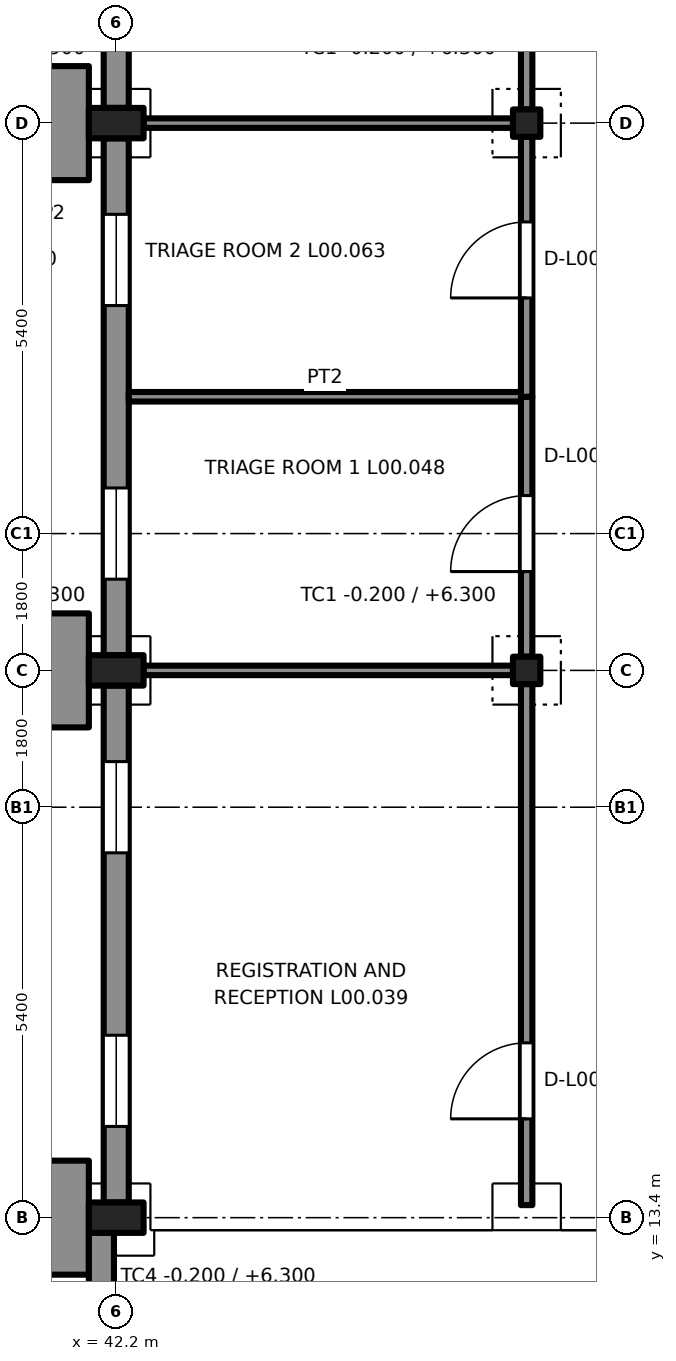
"""IFC4 building model, lengths in metres.
Left out: names, types, materials, properties, quantities, classifications, styles, units other than length and angle.
Written with IfcOpenShell. Run it as: python <this file> out.ifc"""

import sys

from ifc_helpers import new_model, si_unit, direction, frame, frame_2d, origin, origin_2d, place, context, subcontext, project, spatial, rectangle, extrude, element, fill, save


model = new_model("IFC4")
c1 = context("Model", 3, precision=1e-05, world=origin(), true_north=direction((0.0, 1.0)))
c2 = subcontext(c1, "Body", "Model", "MODEL_VIEW")
j1 = project(units=[si_unit("LENGTHUNIT", "METRE"), si_unit("PLANEANGLEUNIT", "RADIAN")], contexts=[c1])
p1 = place(None, origin())
s1 = spatial("IfcSite", under=j1, at=p1, CompositionType="ELEMENT")
p2 = place(p1, origin())
s2 = spatial("IfcBuilding", under=s1, at=p2, CompositionType="ELEMENT")
p3 = place(p2, origin())
s3 = spatial("IfcBuildingStorey", under=s2, at=p3, CompositionType="ELEMENT", Elevation=0.0)
for number, where, z_axis, x_axis in (
    (1, (42.2, 13.4, -0.2), (0.0, 0.0, 1.0), (0.0, 1.0, 0.0)),
    (2, (42.2, 20.6, -0.2), (0.0, 0.0, 1.0), (0.0, 1.0, 0.0)),
    (3, (42.2, 27.8, -0.2), (0.0, 0.0, 1.0), (0.0, 1.0, 0.0)),
):
    element("IfcColumn", number, at=place(p3, frame(where, z_axis=z_axis, x_axis=x_axis)), inside=s3, PredefinedType="COLUMN", context=c2, shape_type="SweptSolid", body=[
        extrude(rectangle(XDim=0.4, YDim=0.72, at=origin_2d()), origin(), (0.0, 0.0, 1.0), 6.5),
    ])
for number, where, z_axis, x_axis in (
    (4, (47.6, 20.6, -0.2), (0.0, 0.0, 1.0), (1.0, 0.0, 0.0)),
    (5, (47.6, 27.8, -0.2), (0.0, 0.0, 1.0), (1.0, 0.0, 0.0)),
):
    element("IfcColumn", number, at=place(p3, frame(where, z_axis=z_axis, x_axis=x_axis)), inside=s3, PredefinedType="COLUMN", context=c2, shape_type="SweptSolid", body=[
        extrude(rectangle(XDim=0.36, YDim=0.36, at=origin_2d()), origin(), (0.0, 0.0, 1.0), 6.5),
    ])
p4 = place(p3, frame((42.2, 13.6, 0.0), z_axis=(0.0, 0.0, 1.0), x_axis=(0.0, 1.0, 0.0)))
e6 = element("IfcWall", 6, at=p4, inside=s3, PredefinedType="SOLIDWALL", context=c2, shape_type="SweptSolid", body=[
    extrude(rectangle(XDim=6.8, YDim=0.33, at=frame_2d((3.4, 0.0))), origin(), (0.0, 0.0, 1.0), 5.62),
])
p5 = place(p4, frame((1.0, 0.0, 0.9)))
e7 = element("IfcOpeningElement", 7, at=p5, cuts=e6, PredefinedType="OPENING", context=c2, shape_type="SweptSolid", body=[
    extrude(rectangle(XDim=1.2, YDim=4.2, at=frame_2d((0.6, 2.1))), frame((0.0, 0.175, 0.0), z_axis=(0.0, -1.0, 0.0), x_axis=(1.0, 0.0, 0.0)), (0.0, 0.0, 1.0), 0.35),
])
p6 = place(p4, frame((4.6, 0.0, 0.9)))
e8 = element("IfcOpeningElement", 8, at=p6, cuts=e6, PredefinedType="OPENING", context=c2, shape_type="SweptSolid", body=[
    extrude(rectangle(XDim=1.2, YDim=4.2, at=frame_2d((0.6, 2.1))), frame((0.0, 0.175, 0.0), z_axis=(0.0, -1.0, 0.0), x_axis=(1.0, 0.0, 0.0)), (0.0, 0.0, 1.0), 0.35),
])
p7 = place(p3, frame((42.2, 20.8, 0.0), z_axis=(0.0, 0.0, 1.0), x_axis=(0.0, 1.0, 0.0)))
e9 = element("IfcWall", 9, at=p7, inside=s3, PredefinedType="SOLIDWALL", context=c2, shape_type="SweptSolid", body=[
    extrude(rectangle(XDim=6.8, YDim=0.33, at=frame_2d((3.4, 0.0))), origin(), (0.0, 0.0, 1.0), 5.62),
])
p8 = place(p7, frame((1.0, 0.0, 0.9)))
e10 = element("IfcOpeningElement", 10, at=p8, cuts=e9, PredefinedType="OPENING", context=c2, shape_type="SweptSolid", body=[
    extrude(rectangle(XDim=1.2, YDim=4.2, at=frame_2d((0.6, 2.1))), frame((0.0, 0.175, 0.0), z_axis=(0.0, -1.0, 0.0), x_axis=(1.0, 0.0, 0.0)), (0.0, 0.0, 1.0), 0.35),
])
p9 = place(p7, frame((4.6, 0.0, 0.9)))
e11 = element("IfcOpeningElement", 11, at=p9, cuts=e9, PredefinedType="OPENING", context=c2, shape_type="SweptSolid", body=[
    extrude(rectangle(XDim=1.2, YDim=4.2, at=frame_2d((0.6, 2.1))), frame((0.0, 0.175, 0.0), z_axis=(0.0, -1.0, 0.0), x_axis=(1.0, 0.0, 0.0)), (0.0, 0.0, 1.0), 0.35),
])
p10 = place(p3, frame((42.2, 28.0, 0.0), z_axis=(0.0, 0.0, 1.0), x_axis=(0.0, 1.0, 0.0)))
e12 = element("IfcWall", 12, at=p10, inside=s3, PredefinedType="SOLIDWALL", context=c2, shape_type="SweptSolid", body=[
    extrude(rectangle(XDim=6.8, YDim=0.33, at=frame_2d((3.4, 0.0))), origin(), (0.0, 0.0, 1.0), 5.62),
])
p11 = place(p10, frame((1.0, 0.0, 0.9)))
e13 = element("IfcOpeningElement", 13, at=p11, cuts=e12, PredefinedType="OPENING", context=c2, shape_type="SweptSolid", body=[
    extrude(rectangle(XDim=1.2, YDim=4.2, at=frame_2d((0.6, 2.1))), frame((0.0, 0.175, 0.0), z_axis=(0.0, -1.0, 0.0), x_axis=(1.0, 0.0, 0.0)), (0.0, 0.0, 1.0), 0.35),
])
p12 = place(p10, frame((4.6, 0.0, 0.9)))
e14 = element("IfcOpeningElement", 14, at=p12, cuts=e12, PredefinedType="OPENING", context=c2, shape_type="SweptSolid", body=[
    extrude(rectangle(XDim=1.2, YDim=4.2, at=frame_2d((0.6, 2.1))), frame((0.0, 0.175, 0.0), z_axis=(0.0, -1.0, 0.0), x_axis=(1.0, 0.0, 0.0)), (0.0, 0.0, 1.0), 0.35),
])
for number, where, z_axis, x_axis in (
    (15, (41.29, 12.65, 0.0), (0.0, 0.0, 1.0), (0.0, 1.0, 0.0)),
    (16, (41.29, 19.85, 0.0), (0.0, 0.0, 1.0), (0.0, 1.0, 0.0)),
    (17, (41.29, 27.05, 0.0), (0.0, 0.0, 1.0), (0.0, 1.0, 0.0)),
):
    element("IfcWall", number, at=place(p3, frame(where, z_axis=z_axis, x_axis=x_axis)), inside=s3, PredefinedType="SOLIDWALL", context=c2, shape_type="SweptSolid", body=[
        extrude(rectangle(XDim=1.5, YDim=1.1, at=frame_2d((0.75, 0.0))), origin(), (0.0, 0.0, 1.0), 6.3),
    ])
p13 = place(p3, frame((42.005, 11.565, 0.0), z_axis=(0.0, 0.0, 1.0), x_axis=(0.0, 1.0, 0.0)))
e18 = element("IfcWall", 18, at=p13, inside=s3, PredefinedType="SOLIDWALL", context=c2, shape_type="SweptSolid", body=[
    extrude(rectangle(XDim=1.635, YDim=0.33, at=frame_2d((0.817, 0.0))), origin(), (0.0, 0.0, 1.0), 9.7),
])
p14 = place(p3, frame((47.6, 13.565, 0.0), z_axis=(0.0, 0.0, 1.0), x_axis=(0.0, 1.0, 0.0)))
e19 = element("IfcWall", 19, at=p14, inside=s3, PredefinedType="PARTITIONING", context=c2, shape_type="SweptSolid", body=[
    extrude(rectangle(XDim=6.855, YDim=0.15, at=frame_2d((3.427, 0.0))), origin(), (0.0, 0.0, 1.0), 12.501),
])
p15 = place(p14, frame((1.135, 0.0, 0.0)))
e20 = element("IfcOpeningElement", 20, at=p15, cuts=e19, PredefinedType="OPENING", context=c2, shape_type="SweptSolid", body=[
    extrude(rectangle(XDim=1.0, YDim=2.1, at=frame_2d((0.5, 1.05))), frame((0.0, 0.085, 0.0), z_axis=(0.0, -1.0, 0.0), x_axis=(1.0, 0.0, 0.0)), (0.0, 0.0, 1.0), 0.17),
])
p16 = place(p3, frame((47.6, 20.78, 0.0), z_axis=(0.0, 0.0, 1.0), x_axis=(0.0, 1.0, 0.0)))
e21 = element("IfcWall", 21, at=p16, inside=s3, PredefinedType="PARTITIONING", context=c2, shape_type="SweptSolid", body=[
    extrude(rectangle(XDim=3.42, YDim=0.15, at=frame_2d((1.71, 0.0))), origin(), (0.0, 0.0, 1.0), 5.62),
])
p17 = place(p16, frame((1.12, 0.0, 0.0)))
e22 = element("IfcOpeningElement", 22, at=p17, cuts=e21, PredefinedType="OPENING", context=c2, shape_type="SweptSolid", body=[
    extrude(rectangle(XDim=1.0, YDim=2.1, at=frame_2d((0.5, 1.05))), frame((0.0, 0.085, 0.0), z_axis=(0.0, -1.0, 0.0), x_axis=(1.0, 0.0, 0.0)), (0.0, 0.0, 1.0), 0.17),
])
p18 = place(p3, frame((42.56, 20.6, 0.0), z_axis=(0.0, 0.0, 1.0), x_axis=(1.0, 0.0, 0.0)))
e23 = element("IfcWall", 23, at=p18, inside=s3, PredefinedType="PARTITIONING", context=c2, shape_type="SweptSolid", body=[
    extrude(rectangle(XDim=4.86, YDim=0.125, at=frame_2d((2.43, 0.0))), origin(), (0.0, 0.0, 1.0), 6.26),
])
p19 = place(p3, frame((47.6, 24.2, 0.0), z_axis=(0.0, 0.0, 1.0), x_axis=(0.0, 1.0, 0.0)))
e24 = element("IfcWall", 24, at=p19, inside=s3, PredefinedType="PARTITIONING", context=c2, shape_type="SweptSolid", body=[
    extrude(rectangle(XDim=3.42, YDim=0.15, at=frame_2d((1.71, 0.0))), origin(), (0.0, 0.0, 1.0), 5.62),
])
p20 = place(p19, frame((1.3, 0.0, 0.0)))
e25 = element("IfcOpeningElement", 25, at=p20, cuts=e24, PredefinedType="OPENING", context=c2, shape_type="SweptSolid", body=[
    extrude(rectangle(XDim=1.0, YDim=2.1, at=frame_2d((0.5, 1.05))), frame((0.0, 0.085, 0.0), z_axis=(0.0, -1.0, 0.0), x_axis=(1.0, 0.0, 0.0)), (0.0, 0.0, 1.0), 0.17),
])
p21 = place(p3, frame((42.365, 24.2, 0.0), z_axis=(0.0, 0.0, 1.0), x_axis=(1.0, 0.0, 0.0)))
e26 = element("IfcWall", 26, at=p21, inside=s3, PredefinedType="PARTITIONING", context=c2, shape_type="SweptSolid", body=[
    extrude(rectangle(XDim=5.16, YDim=0.125, at=frame_2d((2.58, 0.0))), origin(), (0.0, 0.0, 1.0), 6.26),
])
p22 = place(p3, frame((47.6, 27.98, 0.0), z_axis=(0.0, 0.0, 1.0), x_axis=(0.0, 1.0, 0.0)))
e27 = element("IfcWall", 27, at=p22, inside=s3, PredefinedType="PARTITIONING", context=c2, shape_type="SweptSolid", body=[
    extrude(rectangle(XDim=6.84, YDim=0.15, at=frame_2d((3.42, 0.0))), origin(), (0.0, 0.0, 1.0), 5.62),
])
p23 = place(p22, frame((1.12, 0.0, 0.0)))
e28 = element("IfcOpeningElement", 28, at=p23, cuts=e27, PredefinedType="OPENING", context=c2, shape_type="SweptSolid", body=[
    extrude(rectangle(XDim=1.0, YDim=2.1, at=frame_2d((0.5, 1.05))), frame((0.0, 0.085, 0.0), z_axis=(0.0, -1.0, 0.0), x_axis=(1.0, 0.0, 0.0)), (0.0, 0.0, 1.0), 0.17),
])
p24 = place(p3, frame((42.56, 27.8, 0.0), z_axis=(0.0, 0.0, 1.0), x_axis=(1.0, 0.0, 0.0)))
e29 = element("IfcWall", 29, at=p24, inside=s3, PredefinedType="PARTITIONING", context=c2, shape_type="SweptSolid", body=[
    extrude(rectangle(XDim=4.86, YDim=0.125, at=frame_2d((2.43, 0.0))), origin(), (0.0, 0.0, 1.0), 6.26),
])
p25 = place(p5, origin())
e30 = element("IfcWindow", 30, at=p25, inside=s3, PartitioningType="SINGLE_PANEL", PredefinedType="WINDOW", context=c2, shape_type="SweptSolid", body=[
    extrude(rectangle(XDim=1.2, YDim=4.2, at=frame_2d((0.6, 2.1))), frame((0.0, -0.03, 0.0), z_axis=(0.0, -1.0, 0.0), x_axis=(1.0, 0.0, 0.0)), (0.0, 0.0, 1.0), 0.06),
])
fill(e7, e30)
p26 = place(p6, origin())
e31 = element("IfcWindow", 31, at=p26, inside=s3, PartitioningType="SINGLE_PANEL", PredefinedType="WINDOW", context=c2, shape_type="SweptSolid", body=[
    extrude(rectangle(XDim=1.2, YDim=4.2, at=frame_2d((0.6, 2.1))), frame((0.0, -0.03, 0.0), z_axis=(0.0, -1.0, 0.0), x_axis=(1.0, 0.0, 0.0)), (0.0, 0.0, 1.0), 0.06),
])
fill(e8, e31)
p27 = place(p8, origin())
e32 = element("IfcWindow", 32, at=p27, inside=s3, PartitioningType="SINGLE_PANEL", PredefinedType="WINDOW", context=c2, shape_type="SweptSolid", body=[
    extrude(rectangle(XDim=1.2, YDim=4.2, at=frame_2d((0.6, 2.1))), frame((0.0, -0.03, 0.0), z_axis=(0.0, -1.0, 0.0), x_axis=(1.0, 0.0, 0.0)), (0.0, 0.0, 1.0), 0.06),
])
fill(e10, e32)
p28 = place(p9, origin())
e33 = element("IfcWindow", 33, at=p28, inside=s3, PartitioningType="SINGLE_PANEL", PredefinedType="WINDOW", context=c2, shape_type="SweptSolid", body=[
    extrude(rectangle(XDim=1.2, YDim=4.2, at=frame_2d((0.6, 2.1))), frame((0.0, -0.03, 0.0), z_axis=(0.0, -1.0, 0.0), x_axis=(1.0, 0.0, 0.0)), (0.0, 0.0, 1.0), 0.06),
])
fill(e11, e33)
p29 = place(p15, origin())
e34 = element("IfcDoor", 34, at=p29, inside=s3, OperationType="SINGLE_SWING_LEFT", PredefinedType="DOOR", context=c2, shape_type="SweptSolid", body=[
    extrude(rectangle(XDim=1.0, YDim=2.1, at=frame_2d((0.5, 1.05))), frame((0.0, 0.025, 0.0), z_axis=(0.0, -1.0, 0.0), x_axis=(1.0, 0.0, 0.0)), (0.0, 0.0, 1.0), 0.05),
])
fill(e20, e34)
p30 = place(p17, origin())
e35 = element("IfcDoor", 35, at=p30, inside=s3, OperationType="SINGLE_SWING_LEFT", PredefinedType="DOOR", context=c2, shape_type="SweptSolid", body=[
    extrude(rectangle(XDim=1.0, YDim=2.1, at=frame_2d((0.5, 1.05))), frame((0.0, 0.025, 0.0), z_axis=(0.0, -1.0, 0.0), x_axis=(1.0, 0.0, 0.0)), (0.0, 0.0, 1.0), 0.05),
])
fill(e22, e35)
p31 = place(p20, origin())
e36 = element("IfcDoor", 36, at=p31, inside=s3, OperationType="SINGLE_SWING_RIGHT", PredefinedType="DOOR", context=c2, shape_type="SweptSolid", body=[
    extrude(rectangle(XDim=1.0, YDim=2.1, at=frame_2d((0.5, 1.05))), frame((0.0, 0.025, 0.0), z_axis=(0.0, -1.0, 0.0), x_axis=(1.0, 0.0, 0.0)), (0.0, 0.0, 1.0), 0.05),
])
fill(e25, e36)
save(model, sys.argv[1])
